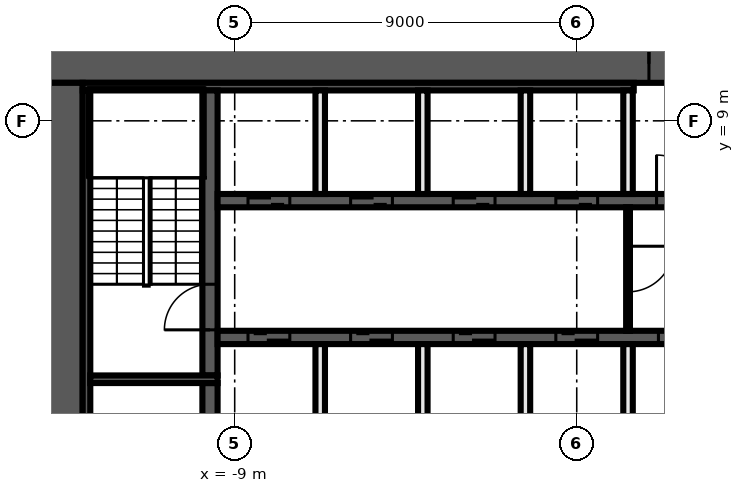
"""IFC4 building model, lengths in metres.
Left out: names, types, materials, properties, quantities, classifications, styles, units other than length and angle.
Written with IfcOpenShell. Run it as: python <this file> out.ifc"""

import sys

from ifc_helpers import new_model, si_unit, direction, frame, frame_2d, origin, place, context, subcontext, project, spatial, rectangle, extrude, element, fill, save


model = new_model("IFC4")
c1 = context("Model", 3, precision=1e-05, world=origin(), true_north=direction((0.0, 1.0)))
c2 = subcontext(c1, "Body", "Model", "MODEL_VIEW")
j1 = project(units=[si_unit("LENGTHUNIT", "METRE"), si_unit("PLANEANGLEUNIT", "RADIAN")], contexts=[c1])
p1 = place(None, origin())
s1 = spatial("IfcSite", under=j1, at=p1, CompositionType="ELEMENT")
p2 = place(p1, origin())
s2 = spatial("IfcBuilding", under=s1, at=p2, CompositionType="ELEMENT")
p3 = place(p2, frame((0.0, 0.0, 121.1)))
s3 = spatial("IfcBuildingStorey", under=s2, at=p3, CompositionType="ELEMENT", Elevation=121.1)
p4 = place(p3, frame((-14.0, 10.5, 0.0), z_axis=(0.0, 0.0, 1.0), x_axis=(1.0, 0.0, 0.0)))
e1 = element("IfcWall", 1, at=p4, inside=s3, PredefinedType="SHEAR", context=c2, shape_type="SweptSolid", body=[
    extrude(rectangle(XDim=28.0, YDim=1.0, at=frame_2d((14.0, 0.0))), origin(), (0.0, 0.0, 1.0), 3.3),
])
p5 = place(p4, frame((15.9, 0.0, 0.0)))
e2 = element("IfcOpeningElement", 2, at=p5, cuts=e1, PredefinedType="OPENING", context=c2, shape_type="SweptSolid", body=[
    extrude(rectangle(XDim=1.6, YDim=2.1, at=frame_2d((0.8, 1.05))), frame((0.0, 0.51, 0.0), z_axis=(0.0, -1.0, 0.0), x_axis=(1.0, 0.0, 0.0)), (0.0, 0.0, 1.0), 1.02),
])
p6 = place(p3, frame((-13.5, -10.0, 0.0), z_axis=(0.0, 0.0, 1.0), x_axis=(0.0, 1.0, 0.0)))
e3 = element("IfcWall", 3, at=p6, inside=s3, PredefinedType="SHEAR", context=c2, shape_type="SweptSolid", body=[
    extrude(rectangle(XDim=20.0, YDim=1.0, at=frame_2d((10.0, 0.0))), origin(), (0.0, 0.0, 1.0), 3.3),
])
p7 = place(p3, frame((-13.0, 9.9, 0.0), z_axis=(0.0, 0.0, 1.0), x_axis=(1.0, 0.0, 0.0)))
e4 = element("IfcWall", 4, at=p7, inside=s3, PredefinedType="SHEAR", context=c2, shape_type="SweptSolid", body=[
    extrude(rectangle(XDim=14.5, YDim=0.2, at=frame_2d((7.25, 0.0))), origin(), (0.0, 0.0, 1.0), 3.3),
])
p8 = place(p3, frame((-12.9, -9.8, 0.0), z_axis=(0.0, 0.0, 1.0), x_axis=(0.0, 1.0, 0.0)))
e5 = element("IfcWall", 5, at=p8, inside=s3, PredefinedType="SHEAR", context=c2, shape_type="SweptSolid", body=[
    extrude(rectangle(XDim=19.6, YDim=0.2, at=frame_2d((9.8, 0.0))), origin(), (0.0, 0.0, 1.0), 3.3),
])
p9 = place(p3, frame((-9.65, -2.1, 0.0), z_axis=(0.0, 0.0, 1.0), x_axis=(0.0, 1.0, 0.0)))
e6 = element("IfcWall", 6, at=p9, inside=s3, PredefinedType="SHEAR", context=c2, shape_type="SweptSolid", body=[
    extrude(rectangle(XDim=4.2, YDim=0.4, at=frame_2d((2.1, 0.0))), origin(), (0.0, 0.0, 1.0), 3.3),
])
p10 = place(p3, frame((-9.65, 2.3, 0.0), z_axis=(0.0, 0.0, 1.0), x_axis=(0.0, 1.0, 0.0)))
e7 = element("IfcWall", 7, at=p10, inside=s3, PredefinedType="SHEAR", context=c2, shape_type="SweptSolid", body=[
    extrude(rectangle(XDim=7.5, YDim=0.4, at=frame_2d((3.75, 0.0))), origin(), (0.0, 0.0, 1.0), 3.3),
])
p11 = place(p10, frame((1.2, 0.0, 0.0)))
e8 = element("IfcOpeningElement", 8, at=p11, cuts=e7, PredefinedType="OPENING", context=c2, shape_type="SweptSolid", body=[
    extrude(rectangle(XDim=1.2, YDim=2.1, at=frame_2d((0.6, 1.05))), frame((0.0, 0.21, 0.0), z_axis=(0.0, -1.0, 0.0), x_axis=(1.0, 0.0, 0.0)), (0.0, 0.0, 1.0), 0.42),
])
p12 = place(p3, frame((-9.45, 2.2, 0.0), z_axis=(0.0, 0.0, 1.0), x_axis=(-1.0, 0.0, 0.0)))
e9 = element("IfcWall", 9, at=p12, inside=s3, PredefinedType="SHEAR", context=c2, shape_type="SweptSolid", body=[
    extrude(rectangle(XDim=3.35, YDim=0.2, at=frame_2d((1.675, 0.0))), origin(), (0.0, 0.0, 1.0), 3.3),
])
p13 = place(p3, frame((-9.45, 6.9, 0.0), z_axis=(0.0, 0.0, 1.0), x_axis=(1.0, 0.0, 0.0)))
e10 = element("IfcWall", 10, at=p13, inside=s3, PredefinedType="SHEAR", context=c2, shape_type="SweptSolid", body=[
    extrude(rectangle(XDim=18.9, YDim=0.35, at=frame_2d((9.45, 0.0))), origin(), (0.0, 0.0, 1.0), 3.3),
])
p14 = place(p13, frame((0.8, 0.0, 0.0)))
e11 = element("IfcOpeningElement", 11, at=p14, cuts=e10, PredefinedType="OPENING", context=c2, shape_type="SweptSolid", body=[
    extrude(rectangle(XDim=1.1, YDim=2.1, at=frame_2d((0.55, 1.05))), frame((0.0, 0.185, 0.0), z_axis=(0.0, -1.0, 0.0), x_axis=(1.0, 0.0, 0.0)), (0.0, 0.0, 1.0), 0.37),
])
p15 = place(p13, frame((3.5, 0.0, 0.0)))
e12 = element("IfcOpeningElement", 12, at=p15, cuts=e10, PredefinedType="OPENING", context=c2, shape_type="SweptSolid", body=[
    extrude(rectangle(XDim=1.1, YDim=2.1, at=frame_2d((0.55, 1.05))), frame((0.0, 0.185, 0.0), z_axis=(0.0, -1.0, 0.0), x_axis=(1.0, 0.0, 0.0)), (0.0, 0.0, 1.0), 0.37),
])
p16 = place(p13, frame((6.2, 0.0, 0.0)))
e13 = element("IfcOpeningElement", 13, at=p16, cuts=e10, PredefinedType="OPENING", context=c2, shape_type="SweptSolid", body=[
    extrude(rectangle(XDim=1.1, YDim=2.1, at=frame_2d((0.55, 1.05))), frame((0.0, 0.185, 0.0), z_axis=(0.0, -1.0, 0.0), x_axis=(1.0, 0.0, 0.0)), (0.0, 0.0, 1.0), 0.37),
])
p17 = place(p13, frame((8.9, 0.0, 0.0)))
e14 = element("IfcOpeningElement", 14, at=p17, cuts=e10, PredefinedType="OPENING", context=c2, shape_type="SweptSolid", body=[
    extrude(rectangle(XDim=1.1, YDim=2.1, at=frame_2d((0.55, 1.05))), frame((0.0, 0.185, 0.0), z_axis=(0.0, -1.0, 0.0), x_axis=(1.0, 0.0, 0.0)), (0.0, 0.0, 1.0), 0.37),
])
p18 = place(p13, frame((11.55, 0.0, 0.0)))
e15 = element("IfcOpeningElement", 15, at=p18, cuts=e10, PredefinedType="OPENING", context=c2, shape_type="SweptSolid", body=[
    extrude(rectangle(XDim=1.2, YDim=2.1, at=frame_2d((0.6, 1.05))), frame((0.0, 0.185, 0.0), z_axis=(0.0, -1.0, 0.0), x_axis=(1.0, 0.0, 0.0)), (0.0, 0.0, 1.0), 0.37),
])
p19 = place(p13, frame((14.3, 0.0, 0.0)))
e16 = element("IfcOpeningElement", 16, at=p19, cuts=e10, PredefinedType="OPENING", context=c2, shape_type="SweptSolid", body=[
    extrude(rectangle(XDim=1.1, YDim=2.1, at=frame_2d((0.55, 1.05))), frame((0.0, 0.185, 0.0), z_axis=(0.0, -1.0, 0.0), x_axis=(1.0, 0.0, 0.0)), (0.0, 0.0, 1.0), 0.37),
])
p20 = place(p13, frame((17.0, 0.0, 0.0)))
e17 = element("IfcOpeningElement", 17, at=p20, cuts=e10, PredefinedType="OPENING", context=c2, shape_type="SweptSolid", body=[
    extrude(rectangle(XDim=1.1, YDim=2.1, at=frame_2d((0.55, 1.05))), frame((0.0, 0.185, 0.0), z_axis=(0.0, -1.0, 0.0), x_axis=(1.0, 0.0, 0.0)), (0.0, 0.0, 1.0), 0.37),
])
p21 = place(p3, frame((9.45, 3.3, 0.0), z_axis=(0.0, 0.0, 1.0), x_axis=(-1.0, 0.0, 0.0)))
e18 = element("IfcWall", 18, at=p21, inside=s3, PredefinedType="SHEAR", context=c2, shape_type="SweptSolid", body=[
    extrude(rectangle(XDim=18.9, YDim=0.35, at=frame_2d((9.45, 0.0))), origin(), (0.0, 0.0, 1.0), 3.3),
])
p22 = place(p21, frame((17.0, 0.0, 0.0)))
e19 = element("IfcOpeningElement", 19, at=p22, cuts=e18, PredefinedType="OPENING", context=c2, shape_type="SweptSolid", body=[
    extrude(rectangle(XDim=1.1, YDim=2.1, at=frame_2d((0.55, 1.05))), frame((0.0, 0.185, 0.0), z_axis=(0.0, -1.0, 0.0), x_axis=(1.0, 0.0, 0.0)), (0.0, 0.0, 1.0), 0.37),
])
p23 = place(p21, frame((14.3, 0.0, 0.0)))
e20 = element("IfcOpeningElement", 20, at=p23, cuts=e18, PredefinedType="OPENING", context=c2, shape_type="SweptSolid", body=[
    extrude(rectangle(XDim=1.1, YDim=2.1, at=frame_2d((0.55, 1.05))), frame((0.0, 0.185, 0.0), z_axis=(0.0, -1.0, 0.0), x_axis=(1.0, 0.0, 0.0)), (0.0, 0.0, 1.0), 0.37),
])
p24 = place(p21, frame((11.6, 0.0, 0.0)))
e21 = element("IfcOpeningElement", 21, at=p24, cuts=e18, PredefinedType="OPENING", context=c2, shape_type="SweptSolid", body=[
    extrude(rectangle(XDim=1.1, YDim=2.1, at=frame_2d((0.55, 1.05))), frame((0.0, 0.185, 0.0), z_axis=(0.0, -1.0, 0.0), x_axis=(1.0, 0.0, 0.0)), (0.0, 0.0, 1.0), 0.37),
])
p25 = place(p21, frame((8.9, 0.0, 0.0)))
e22 = element("IfcOpeningElement", 22, at=p25, cuts=e18, PredefinedType="OPENING", context=c2, shape_type="SweptSolid", body=[
    extrude(rectangle(XDim=1.1, YDim=2.1, at=frame_2d((0.55, 1.05))), frame((0.0, 0.185, 0.0), z_axis=(0.0, -1.0, 0.0), x_axis=(1.0, 0.0, 0.0)), (0.0, 0.0, 1.0), 0.37),
])
p26 = place(p21, frame((6.2, 0.0, 0.0)))
e23 = element("IfcOpeningElement", 23, at=p26, cuts=e18, PredefinedType="OPENING", context=c2, shape_type="SweptSolid", body=[
    extrude(rectangle(XDim=1.1, YDim=2.1, at=frame_2d((0.55, 1.05))), frame((0.0, 0.185, 0.0), z_axis=(0.0, -1.0, 0.0), x_axis=(1.0, 0.0, 0.0)), (0.0, 0.0, 1.0), 0.37),
])
p27 = place(p21, frame((3.5, 0.0, 0.0)))
e24 = element("IfcOpeningElement", 24, at=p27, cuts=e18, PredefinedType="OPENING", context=c2, shape_type="SweptSolid", body=[
    extrude(rectangle(XDim=1.1, YDim=2.1, at=frame_2d((0.55, 1.05))), frame((0.0, 0.185, 0.0), z_axis=(0.0, -1.0, 0.0), x_axis=(1.0, 0.0, 0.0)), (0.0, 0.0, 1.0), 0.37),
])
p28 = place(p21, frame((0.9, 0.0, 0.0)))
e25 = element("IfcOpeningElement", 25, at=p28, cuts=e18, PredefinedType="OPENING", context=c2, shape_type="SweptSolid", body=[
    extrude(rectangle(XDim=0.9, YDim=2.1, at=frame_2d((0.45, 1.05))), frame((0.0, 0.185, 0.0), z_axis=(0.0, -1.0, 0.0), x_axis=(1.0, 0.0, 0.0)), (0.0, 0.0, 1.0), 0.37),
])
p29 = place(p3, frame((1.35, 6.725, 0.0), z_axis=(0.0, 0.0, 1.0), x_axis=(0.0, -1.0, 0.0)))
e26 = element("IfcWall", 26, at=p29, inside=s3, PredefinedType="PARTITIONING", context=c2, shape_type="SweptSolid", body=[
    extrude(rectangle(XDim=3.25, YDim=0.1, at=frame_2d((1.625, 0.0))), origin(), (0.0, 0.0, 1.0), 3.3),
])
p30 = place(p29, frame((1.025, 0.0, 0.0)))
e27 = element("IfcOpeningElement", 27, at=p30, cuts=e26, PredefinedType="OPENING", context=c2, shape_type="SweptSolid", body=[
    extrude(rectangle(XDim=1.2, YDim=2.1, at=frame_2d((0.6, 1.05))), frame((0.0, 0.06, 0.0), z_axis=(0.0, -1.0, 0.0), x_axis=(1.0, 0.0, 0.0)), (0.0, 0.0, 1.0), 0.12),
])
for number, where, z_axis, x_axis in (
    (28, (1.35, 0.4, 0.0), (0.0, 0.0, 1.0), (0.0, 1.0, 0.0)),
    (29, (1.35, 7.075, 0.0), (0.0, 0.0, 1.0), (0.0, 1.0, 0.0)),
    (30, (-1.35, 0.4, 0.0), (0.0, 0.0, 1.0), (0.0, 1.0, 0.0)),
    (31, (-1.35, 7.075, 0.0), (0.0, 0.0, 1.0), (0.0, 1.0, 0.0)),
    (32, (-4.05, 0.4, 0.0), (0.0, 0.0, 1.0), (0.0, 1.0, 0.0)),
    (33, (-4.05, 7.075, 0.0), (0.0, 0.0, 1.0), (0.0, 1.0, 0.0)),
    (34, (-6.75, 0.4, 0.0), (0.0, 0.0, 1.0), (0.0, 1.0, 0.0)),
    (35, (-6.75, 7.075, 0.0), (0.0, 0.0, 1.0), (0.0, 1.0, 0.0)),
):
    element("IfcWall", number, at=place(p3, frame(where, z_axis=z_axis, x_axis=x_axis)), inside=s3, PredefinedType="SOLIDWALL", context=c2, shape_type="SweptSolid", body=[
        extrude(rectangle(XDim=2.725, YDim=0.25, at=frame_2d((1.363, 0.0))), origin(), (0.0, 0.0, 1.0), 3.3),
    ])
p31 = place(p14, origin())
e36 = element("IfcDoor", 36, at=p31, inside=s3, OperationType="DOUBLE_DOOR_SLIDING", PredefinedType="DOOR", context=c2, shape_type="SweptSolid", body=[
    extrude(rectangle(XDim=1.1, YDim=2.1, at=frame_2d((0.55, 1.05))), frame((0.0, 0.025, 0.0), z_axis=(0.0, -1.0, 0.0), x_axis=(1.0, 0.0, 0.0)), (0.0, 0.0, 1.0), 0.05),
])
fill(e11, e36)
p32 = place(p15, origin())
e37 = element("IfcDoor", 37, at=p32, inside=s3, OperationType="DOUBLE_DOOR_SLIDING", PredefinedType="DOOR", context=c2, shape_type="SweptSolid", body=[
    extrude(rectangle(XDim=1.1, YDim=2.1, at=frame_2d((0.55, 1.05))), frame((0.0, 0.025, 0.0), z_axis=(0.0, -1.0, 0.0), x_axis=(1.0, 0.0, 0.0)), (0.0, 0.0, 1.0), 0.05),
])
fill(e12, e37)
p33 = place(p16, origin())
e38 = element("IfcDoor", 38, at=p33, inside=s3, OperationType="DOUBLE_DOOR_SLIDING", PredefinedType="DOOR", context=c2, shape_type="SweptSolid", body=[
    extrude(rectangle(XDim=1.1, YDim=2.1, at=frame_2d((0.55, 1.05))), frame((0.0, 0.025, 0.0), z_axis=(0.0, -1.0, 0.0), x_axis=(1.0, 0.0, 0.0)), (0.0, 0.0, 1.0), 0.05),
])
fill(e13, e38)
p34 = place(p17, origin())
e39 = element("IfcDoor", 39, at=p34, inside=s3, OperationType="DOUBLE_DOOR_SLIDING", PredefinedType="DOOR", context=c2, shape_type="SweptSolid", body=[
    extrude(rectangle(XDim=1.1, YDim=2.1, at=frame_2d((0.55, 1.05))), frame((0.0, 0.025, 0.0), z_axis=(0.0, -1.0, 0.0), x_axis=(1.0, 0.0, 0.0)), (0.0, 0.0, 1.0), 0.05),
])
fill(e14, e39)
p35 = place(p5, origin())
e40 = element("IfcDoor", 40, at=p35, inside=s3, OperationType="DOUBLE_DOOR_SINGLE_SWING", PredefinedType="DOOR", context=c2, shape_type="SweptSolid", body=[
    extrude(rectangle(XDim=1.6, YDim=2.1, at=frame_2d((0.8, 1.05))), frame((0.0, 0.025, 0.0), z_axis=(0.0, -1.0, 0.0), x_axis=(1.0, 0.0, 0.0)), (0.0, 0.0, 1.0), 0.05),
])
fill(e2, e40)
p36 = place(p18, origin())
e41 = element("IfcDoor", 41, at=p36, inside=s3, OperationType="SINGLE_SWING_LEFT", PredefinedType="DOOR", context=c2, shape_type="SweptSolid", body=[
    extrude(rectangle(XDim=1.2, YDim=2.1, at=frame_2d((0.6, 1.05))), frame((0.0, 0.025, 0.0), z_axis=(0.0, -1.0, 0.0), x_axis=(1.0, 0.0, 0.0)), (0.0, 0.0, 1.0), 0.05),
])
fill(e15, e41)
p37 = place(p22, origin())
e42 = element("IfcDoor", 42, at=p37, inside=s3, OperationType="DOUBLE_DOOR_SLIDING", PredefinedType="DOOR", context=c2, shape_type="SweptSolid", body=[
    extrude(rectangle(XDim=1.1, YDim=2.1, at=frame_2d((0.55, 1.05))), frame((0.0, 0.025, 0.0), z_axis=(0.0, -1.0, 0.0), x_axis=(1.0, 0.0, 0.0)), (0.0, 0.0, 1.0), 0.05),
])
fill(e19, e42)
p38 = place(p23, origin())
e43 = element("IfcDoor", 43, at=p38, inside=s3, OperationType="DOUBLE_DOOR_SLIDING", PredefinedType="DOOR", context=c2, shape_type="SweptSolid", body=[
    extrude(rectangle(XDim=1.1, YDim=2.1, at=frame_2d((0.55, 1.05))), frame((0.0, 0.025, 0.0), z_axis=(0.0, -1.0, 0.0), x_axis=(1.0, 0.0, 0.0)), (0.0, 0.0, 1.0), 0.05),
])
fill(e20, e43)
p39 = place(p24, origin())
e44 = element("IfcDoor", 44, at=p39, inside=s3, OperationType="DOUBLE_DOOR_SLIDING", PredefinedType="DOOR", context=c2, shape_type="SweptSolid", body=[
    extrude(rectangle(XDim=1.1, YDim=2.1, at=frame_2d((0.55, 1.05))), frame((0.0, 0.025, 0.0), z_axis=(0.0, -1.0, 0.0), x_axis=(1.0, 0.0, 0.0)), (0.0, 0.0, 1.0), 0.05),
])
fill(e21, e44)
p40 = place(p25, origin())
e45 = element("IfcDoor", 45, at=p40, inside=s3, OperationType="DOUBLE_DOOR_SLIDING", PredefinedType="DOOR", context=c2, shape_type="SweptSolid", body=[
    extrude(rectangle(XDim=1.1, YDim=2.1, at=frame_2d((0.55, 1.05))), frame((0.0, 0.025, 0.0), z_axis=(0.0, -1.0, 0.0), x_axis=(1.0, 0.0, 0.0)), (0.0, 0.0, 1.0), 0.05),
])
fill(e22, e45)
p41 = place(p26, origin())
e46 = element("IfcDoor", 46, at=p41, inside=s3, OperationType="DOUBLE_DOOR_SLIDING", PredefinedType="DOOR", context=c2, shape_type="SweptSolid", body=[
    extrude(rectangle(XDim=1.1, YDim=2.1, at=frame_2d((0.55, 1.05))), frame((0.0, 0.025, 0.0), z_axis=(0.0, -1.0, 0.0), x_axis=(1.0, 0.0, 0.0)), (0.0, 0.0, 1.0), 0.05),
])
fill(e23, e46)
p42 = place(p11, origin())
e47 = element("IfcDoor", 47, at=p42, inside=s3, OperationType="SINGLE_SWING_RIGHT", PredefinedType="DOOR", context=c2, shape_type="SweptSolid", body=[
    extrude(rectangle(XDim=1.2, YDim=2.1, at=frame_2d((0.6, 1.05))), frame((0.0, 0.025, 0.0), z_axis=(0.0, -1.0, 0.0), x_axis=(1.0, 0.0, 0.0)), (0.0, 0.0, 1.0), 0.05),
])
fill(e8, e47)
p43 = place(p30, origin())
e48 = element("IfcDoor", 48, at=p43, inside=s3, OperationType="SINGLE_SWING_LEFT", PredefinedType="DOOR", context=c2, shape_type="SweptSolid", body=[
    extrude(rectangle(XDim=1.2, YDim=2.1, at=frame_2d((0.6, 1.05))), frame((0.0, 0.025, 0.0), z_axis=(0.0, -1.0, 0.0), x_axis=(1.0, 0.0, 0.0)), (0.0, 0.0, 1.0), 0.05),
])
fill(e27, e48)
save(model, sys.argv[1])
